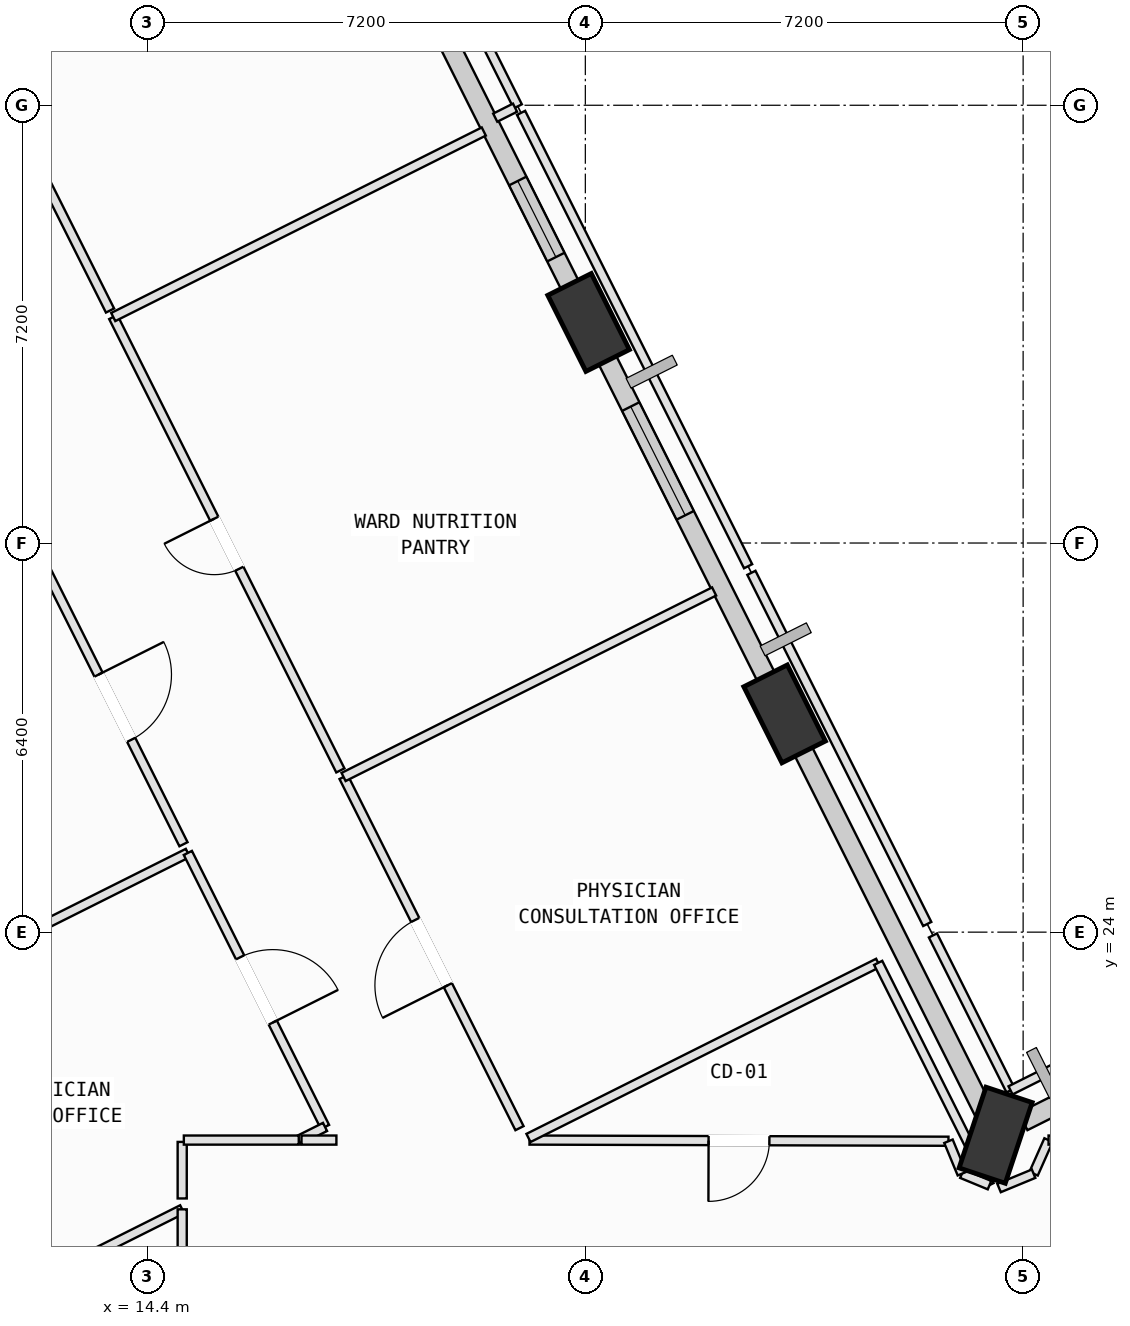
"""IFC4 building model, lengths in metres.
Left out: names, types, materials, properties, quantities, classifications, styles, units other than length and angle.
Written with IfcOpenShell. Run it as: python <this file> out.ifc"""

import sys

from ifc_helpers import new_model, si_unit, direction, frame, frame_2d, origin, origin_2d, place, context, subcontext, project, spatial, rectangle, extrude, element, fill, save


model = new_model("IFC4")
c1 = context("Model", 3, precision=1e-05, world=origin(), true_north=direction((0.0, 1.0)))
c2 = subcontext(c1, "Body", "Model", "MODEL_VIEW")
j1 = project(units=[si_unit("LENGTHUNIT", "METRE"), si_unit("PLANEANGLEUNIT", "RADIAN")], contexts=[c1])
p1 = place(None, origin())
s1 = spatial("IfcSite", under=j1, at=p1, CompositionType="ELEMENT")
p2 = place(p1, origin())
s2 = spatial("IfcBuilding", under=s1, at=p2, CompositionType="ELEMENT")
p3 = place(p2, frame((0.0, 0.0, 136.4)))
s3 = spatial("IfcBuildingStorey", under=s2, at=p3, CompositionType="ELEMENT", Elevation=136.4)
p4 = place(p3, frame((28.348, 20.66, 0.002), z_axis=(0.017282154619, -0.021617960194, 0.99961692209), x_axis=(-0.345727391393, 0.93796742084, 0.026261916961)))
e1 = element("IfcColumn", 1, at=p4, inside=s3, PredefinedType="COLUMN", context=c2, shape_type="SweptSolid", body=[
    extrude(rectangle(XDim=1.4, YDim=0.8, at=origin_2d()), origin(), (0.0, 0.0, 1.0), 3.998),
])
p5 = place(p3, frame((24.878, 27.59, 0.002), z_axis=(-0.011293721781, -0.036200956843, 0.999280712599), x_axis=(-0.161338689322, 0.986316421564, 0.033907873448)))
e2 = element("IfcColumn", 2, at=p5, inside=s3, PredefinedType="COLUMN", context=c2, shape_type="SweptSolid", body=[
    extrude(rectangle(XDim=1.4, YDim=0.8, at=origin_2d()), origin(), (0.0, 0.0, 1.0), 3.999),
])
p6 = place(p3, frame((21.654, 34.028, 0.002), z_axis=(-0.037802459463, -0.04975291439, 0.998045901534), x_axis=(0.183369674187, 0.981455024932, 0.055871250433)))
e3 = element("IfcColumn", 3, at=p6, inside=s3, PredefinedType="COLUMN", context=c2, shape_type="SweptSolid", body=[
    extrude(rectangle(XDim=1.4, YDim=0.8, at=origin_2d()), origin(), (0.0, 0.0, 1.0), 4.004),
])
p7 = place(p3, frame((18.967, 39.393, 0.002), z_axis=(-0.059772525944, -0.060929020845, 0.996350791419), x_axis=(0.304258319509, 0.949527435754, 0.076318567594)))
e4 = element("IfcColumn", 4, at=p7, inside=s3, PredefinedType="COLUMN", context=c2, shape_type="SweptSolid", body=[
    extrude(rectangle(XDim=1.4, YDim=0.8, at=origin_2d()), origin(), (0.0, 0.0, 1.0), 4.011),
])
p8 = place(p3, frame((28.799, 20.886, 0.0), z_axis=(0.0, 0.0, 1.0), x_axis=(0.894148466578, 0.447770610599, 0.0)))
e5 = element("IfcWall", 5, at=p8, inside=s3, PredefinedType="SOLIDWALL", context=c2, shape_type="SweptSolid", body=[
    extrude(rectangle(XDim=5.96, YDim=0.32, at=frame_2d((2.98, 0.0))), origin(), (0.0, 0.0, 1.0), 2.965),
])
p9 = place(p3, frame((25.123, 27.1, 0.0), z_axis=(0.0, 0.0, 1.0), x_axis=(0.447762469935, -0.894152543204, 0.0)))
e6 = element("IfcWall", 6, at=p9, inside=s3, PredefinedType="SOLIDWALL", context=c2, shape_type="SweptSolid", body=[
    extrude(rectangle(XDim=6.76, YDim=0.32, at=frame_2d((3.38, 0.0))), origin(), (0.0, 0.0, 1.0), 3.165),
])
p10 = place(p3, frame((21.895, 33.546, 0.0), z_axis=(0.0, 0.0, 1.0), x_axis=(0.447731401231, -0.894168100724, 0.0)))
e7 = element("IfcWall", 7, at=p10, inside=s3, PredefinedType="SOLIDWALL", context=c2, shape_type="SweptSolid", body=[
    extrude(rectangle(XDim=6.223, YDim=0.32, at=frame_2d((3.111, 0.0))), origin(), (0.0, 0.0, 1.0), 3.165),
])
p11 = place(p10, frame((1.009, 0.0, 0.75)))
e8 = element("IfcOpeningElement", 8, at=p11, cuts=e7, PredefinedType="OPENING", context=c2, shape_type="SweptSolid", body=[
    extrude(rectangle(XDim=2.0, YDim=1.95, at=frame_2d((1.0, 0.975))), frame((0.0, 0.17, 0.0), z_axis=(0.0, -1.0, 0.0), x_axis=(1.0, 0.0, 0.0)), (0.0, 0.0, 1.0), 0.34),
])
p12 = place(p3, frame((19.202, 38.924, 0.0), z_axis=(0.0, 0.0, 1.0), x_axis=(0.447755250405, -0.894156158473, 0.0)))
e9 = element("IfcWall", 9, at=p12, inside=s3, PredefinedType="SOLIDWALL", context=c2, shape_type="SweptSolid", body=[
    extrude(rectangle(XDim=5.047, YDim=0.32, at=frame_2d((2.524, 0.0))), origin(), (0.0, 0.0, 1.0), 3.165),
])
p13 = place(p12, frame((2.873, 0.0, 0.75)))
e10 = element("IfcOpeningElement", 10, at=p13, cuts=e9, PredefinedType="OPENING", context=c2, shape_type="SweptSolid", body=[
    extrude(rectangle(XDim=1.4, YDim=1.85, at=frame_2d((0.7, 0.925))), frame((0.0, 0.17, 0.0), z_axis=(0.0, -1.0, 0.0), x_axis=(1.0, 0.0, 0.0)), (0.0, 0.0, 1.0), 0.34),
])
p14 = place(p3, frame((7.587, 15.744, 0.0), z_axis=(0.0, 0.0, 1.0), x_axis=(0.894160922131, 0.447745737371, 0.0)))
e11 = element("IfcWall", 11, at=p14, inside=s3, PredefinedType="PARTITIONING", context=c2, shape_type="SweptSolid", body=[
    extrude(rectangle(XDim=8.257, YDim=0.15, at=frame_2d((4.128, 0.0))), origin(), (0.0, 0.0, 1.0), 3.78),
])
p15 = place(p14, frame((3.529, 0.0, 0.0)))
e12 = element("IfcOpeningElement", 12, at=p15, cuts=e11, PredefinedType="OPENING", context=c2, shape_type="SweptSolid", body=[
    extrude(rectangle(XDim=1.2, YDim=2.15, at=frame_2d((0.6, 1.075))), frame((0.0, 0.085, 0.0), z_axis=(0.0, -1.0, 0.0), x_axis=(1.0, 0.0, 0.0)), (0.0, 0.0, 1.0), 0.17),
])
p16 = place(p3, frame((14.97, 19.441, 0.0), z_axis=(0.0, 0.0, 1.0), x_axis=(0.0, -1.0, 0.0)))
e13 = element("IfcWall", 13, at=p16, inside=s3, PredefinedType="PARTITIONING", context=c2, shape_type="SweptSolid", body=[
    extrude(rectangle(XDim=1.211, YDim=0.15, at=frame_2d((0.605, 0.0))), origin(), (0.0, 0.0, 1.0), 2.965),
])
p17 = place(p3, frame((14.97, 20.55, 0.0), z_axis=(0.0, 0.0, 1.0), x_axis=(0.0, -1.0, 0.0)))
e14 = element("IfcWall", 14, at=p17, inside=s3, PredefinedType="PARTITIONING", context=c2, shape_type="SweptSolid", body=[
    extrude(rectangle(XDim=0.93, YDim=0.15, at=frame_2d((0.465, 0.0))), origin(), (0.0, 0.0, 1.0), 2.965),
])
p18 = place(p3, frame((5.203, 20.366, 0.0), z_axis=(0.0, 0.0, 1.0), x_axis=(0.894174650725, 0.447718319929, 0.0)))
e15 = element("IfcWall", 15, at=p18, inside=s3, PredefinedType="PARTITIONING", context=c2, shape_type="SweptSolid", body=[
    extrude(rectangle(XDim=11.027, YDim=0.15, at=frame_2d((5.514, 0.0))), origin(), (0.0, 0.0, 1.0), 3.78),
])
p19 = place(p3, frame((15.063, 25.303, 0.0), z_axis=(0.0, 0.0, 1.0), x_axis=(0.447620432857, -0.894223656637, 0.0)))
e16 = element("IfcWall", 16, at=p19, inside=s3, PredefinedType="PARTITIONING", context=c2, shape_type="SweptSolid", body=[
    extrude(rectangle(XDim=5.04, YDim=0.15, at=frame_2d((2.52, 0.0))), origin(), (0.0, 0.0, 1.0), 3.78),
])
p20 = place(p19, frame((1.92, 0.0, 0.0)))
e17 = element("IfcOpeningElement", 17, at=p20, cuts=e16, PredefinedType="OPENING", context=c2, shape_type="SweptSolid", body=[
    extrude(rectangle(XDim=1.2, YDim=2.15, at=frame_2d((0.6, 1.075))), frame((0.0, 0.085, 0.0), z_axis=(0.0, -1.0, 0.0), x_axis=(1.0, 0.0, 0.0)), (0.0, 0.0, 1.0), 0.17),
])
p21 = place(p3, frame((17.319, 20.796, 0.0), z_axis=(0.0, 0.0, 1.0), x_axis=(-0.894629275708, -0.446809197585, 0.0)))
e18 = element("IfcWall", 18, at=p21, inside=s3, PredefinedType="PARTITIONING", context=c2, shape_type="SweptSolid", body=[
    extrude(rectangle(XDim=0.483, YDim=0.15, at=frame_2d((0.241, 0.0))), origin(), (0.0, 0.0, 1.0), 3.78),
])
p22 = place(p3, frame((16.887, 20.58, 0.0), z_axis=(0.0, 0.0, 1.0), x_axis=(-1.0, 0.0, 0.0)))
e19 = element("IfcWall", 19, at=p22, inside=s3, PredefinedType="PARTITIONING", context=c2, shape_type="SweptSolid", body=[
    extrude(rectangle(XDim=1.89, YDim=0.15, at=frame_2d((0.945, 0.0))), origin(), (0.0, 0.0, 1.0), 3.78),
])
p23 = place(p3, frame((12.734, 29.953, 0.0), z_axis=(0.0, 0.0, 1.0), x_axis=(0.447794738158, -0.894136383601, 0.0)))
e20 = element("IfcWall", 20, at=p23, inside=s3, PredefinedType="PARTITIONING", context=c2, shape_type="SweptSolid", body=[
    extrude(rectangle(XDim=5.041, YDim=0.15, at=frame_2d((2.52, 0.0))), origin(), (0.0, 0.0, 1.0), 3.78),
])
p24 = place(p23, frame((1.92, 0.0, 0.0)))
e21 = element("IfcOpeningElement", 21, at=p24, cuts=e20, PredefinedType="OPENING", context=c2, shape_type="SweptSolid", body=[
    extrude(rectangle(XDim=1.2, YDim=2.15, at=frame_2d((0.6, 1.075))), frame((0.0, 0.085, 0.0), z_axis=(0.0, -1.0, 0.0), x_axis=(1.0, 0.0, 0.0)), (0.0, 0.0, 1.0), 0.17),
])
p25 = place(p3, frame((27.572, 20.561, 0.0), z_axis=(0.0, 0.0, 1.0), x_axis=(-0.999996180723, 0.002763790734, 0.0)))
e22 = element("IfcWall", 22, at=p25, inside=s3, PredefinedType="PARTITIONING", context=c2, shape_type="SweptSolid", body=[
    extrude(rectangle(XDim=6.89, YDim=0.15, at=frame_2d((3.445, 0.0))), origin(), (0.0, 0.0, 1.0), 3.78),
])
p26 = place(p25, frame((2.945, 0.0, 0.0)))
e23 = element("IfcOpeningElement", 23, at=p26, cuts=e22, PredefinedType="OPENING", context=c2, shape_type="SweptSolid", body=[
    extrude(rectangle(XDim=1.0, YDim=2.12, at=frame_2d((0.5, 1.06))), frame((0.0, 0.085, 0.0), z_axis=(0.0, -1.0, 0.0), x_axis=(1.0, 0.0, 0.0)), (0.0, 0.0, 1.0), 0.17),
])
p27 = place(p3, frame((20.665, 20.615, 0.0), z_axis=(0.0, 0.0, 1.0), x_axis=(0.894138524152, 0.447790463976, 0.0)))
e24 = element("IfcWall", 24, at=p27, inside=s3, PredefinedType="PARTITIONING", context=c2, shape_type="SweptSolid", body=[
    extrude(rectangle(XDim=6.432, YDim=0.15, at=frame_2d((3.216, 0.0))), origin(), (0.0, 0.0, 1.0), 3.78),
])
p28 = place(p3, frame((26.416, 23.495, 0.0), z_axis=(0.0, 0.0, 1.0), x_axis=(0.447810576622, -0.894128451323, 0.0)))
e25 = element("IfcWall", 25, at=p28, inside=s3, PredefinedType="PARTITIONING", context=c2, shape_type="SweptSolid", body=[
    extrude(rectangle(XDim=4.089, YDim=0.15, at=frame_2d((2.044, 0.0))), origin(), (0.0, 0.0, 1.0), 3.165),
])
p29 = place(p3, frame((28.247, 19.839, 0.0), z_axis=(0.0, 0.0, 1.0), x_axis=(-0.923956302996, 0.382498039412, 0.0)))
e26 = element("IfcWall", 26, at=p29, inside=s3, PredefinedType="PARTITIONING", context=c2, shape_type="SweptSolid", body=[
    extrude(rectangle(XDim=0.491, YDim=0.15, at=frame_2d((0.246, 0.0))), origin(), (0.0, 0.0, 1.0), 3.78),
])
p30 = place(p3, frame((27.793, 20.027, 0.0), z_axis=(0.0, 0.0, 1.0), x_axis=(-0.382364231834, 0.924011685107, 0.0)))
e27 = element("IfcWall", 27, at=p30, inside=s3, PredefinedType="PARTITIONING", context=c2, shape_type="SweptSolid", body=[
    extrude(rectangle(XDim=0.578, YDim=0.15, at=frame_2d((0.289, 0.0))), origin(), (0.0, 0.0, 1.0), 3.78),
])
p31 = place(p3, frame((29.218, 20.58, 0.0), z_axis=(0.0, 0.0, 1.0), x_axis=(-0.406587519567, -0.913611837123, 0.0)))
e28 = element("IfcWall", 28, at=p31, inside=s3, PredefinedType="PARTITIONING", context=c2, shape_type="SweptSolid", body=[
    extrude(rectangle(XDim=0.605, YDim=0.15, at=frame_2d((0.303, 0.0))), origin(), (0.0, 0.0, 1.0), 3.78),
])
p32 = place(p3, frame((28.972, 20.027, 0.0), z_axis=(0.0, 0.0, 1.0), x_axis=(-0.923944226518, -0.382527209861, 0.0)))
e29 = element("IfcWall", 29, at=p32, inside=s3, PredefinedType="PARTITIONING", context=c2, shape_type="SweptSolid", body=[
    extrude(rectangle(XDim=0.615, YDim=0.15, at=frame_2d((0.307, 0.0))), origin(), (0.0, 0.0, 1.0), 3.78),
])
p33 = place(p3, frame((27.317, 23.946, 0.0), z_axis=(0.0, 0.0, 1.0), x_axis=(0.447796055297, -0.894135723959, 0.0)))
e30 = element("IfcWall", 30, at=p33, inside=s3, PredefinedType="PARTITIONING", context=c2, shape_type="SweptSolid", body=[
    extrude(rectangle(XDim=2.85, YDim=0.15, at=frame_2d((1.425, 0.0))), origin(), (0.0, 0.0, 1.0), 3.78),
])
p34 = place(p3, frame((28.593, 21.398, 0.0), z_axis=(0.0, 0.0, 1.0), x_axis=(0.894187389423, 0.447692877536, 0.0)))
e31 = element("IfcWall", 31, at=p34, inside=s3, PredefinedType="PARTITIONING", context=c2, shape_type="SweptSolid", body=[
    extrude(rectangle(XDim=5.908, YDim=0.15, at=frame_2d((2.954, 0.0))), origin(), (0.0, 0.0, 1.0), 3.78),
])
p35 = place(p3, frame((34.419, 20.58, 0.0), z_axis=(0.0, 0.0, 1.0), x_axis=(-1.0, 0.0, 0.0)))
e32 = element("IfcWall", 32, at=p35, inside=s3, PredefinedType="PARTITIONING", context=c2, shape_type="SweptSolid", body=[
    extrude(rectangle(XDim=5.201, YDim=0.15, at=frame_2d((2.601, 0.0))), origin(), (0.0, 0.0, 1.0), 3.365),
])
p36 = place(p35, frame((2.101, 0.0, 0.0)))
e33 = element("IfcOpeningElement", 33, at=p36, cuts=e32, PredefinedType="OPENING", context=c2, shape_type="SweptSolid", body=[
    extrude(rectangle(XDim=1.0, YDim=2.12, at=frame_2d((0.5, 1.06))), frame((0.0, 0.085, 0.0), z_axis=(0.0, -1.0, 0.0), x_axis=(1.0, 0.0, 0.0)), (0.0, 0.0, 1.0), 0.17),
])
p37 = place(p3, frame((20.517, 20.776, 0.0), z_axis=(0.0, 0.0, 1.0), x_axis=(-0.447833274266, 0.894117083195, 0.0)))
e34 = element("IfcWall", 34, at=p37, inside=s3, PredefinedType="PARTITIONING", context=c2, shape_type="SweptSolid", body=[
    extrude(rectangle(XDim=6.46, YDim=0.15, at=frame_2d((3.23, 0.0))), origin(), (0.0, 0.0, 1.0), 3.78),
])
p38 = place(p37, frame((2.63, 0.0, 0.0)))
e35 = element("IfcOpeningElement", 35, at=p38, cuts=e34, PredefinedType="OPENING", context=c2, shape_type="SweptSolid", body=[
    extrude(rectangle(XDim=1.2, YDim=2.15, at=frame_2d((0.6, 1.075))), frame((0.0, 0.085, 0.0), z_axis=(0.0, -1.0, 0.0), x_axis=(1.0, 0.0, 0.0)), (0.0, 0.0, 1.0), 0.17),
])
p39 = place(p3, frame((17.624, 26.552, 0.0), z_axis=(0.0, 0.0, 1.0), x_axis=(0.894190630835, 0.447686403331, 0.0)))
e36 = element("IfcWall", 36, at=p39, inside=s3, PredefinedType="PARTITIONING", context=c2, shape_type="SweptSolid", body=[
    extrude(rectangle(XDim=6.815, YDim=0.15, at=frame_2d((3.408, 0.0))), origin(), (0.0, 0.0, 1.0), 3.78),
])
p40 = place(p3, frame((24.331, 29.91, 0.0), z_axis=(0.0, 0.0, 1.0), x_axis=(0.447697322881, -0.894185163758, 0.0)))
e37 = element("IfcWall", 37, at=p40, inside=s3, PredefinedType="PARTITIONING", context=c2, shape_type="SweptSolid", body=[
    extrude(rectangle(XDim=6.459, YDim=0.15, at=frame_2d((3.23, 0.0))), origin(), (0.0, 0.0, 1.0), 3.78),
])
p41 = place(p3, frame((17.571, 26.66, 0.0), z_axis=(0.0, 0.0, 1.0), x_axis=(-0.447845777943, 0.894110820412, 0.0)))
e38 = element("IfcWall", 38, at=p41, inside=s3, PredefinedType="PARTITIONING", context=c2, shape_type="SweptSolid", body=[
    extrude(rectangle(XDim=8.34, YDim=0.15, at=frame_2d((4.17, 0.0))), origin(), (0.0, 0.0, 1.0), 3.78),
])
p42 = place(p41, frame((3.71, 0.0, 0.0)))
e39 = element("IfcOpeningElement", 39, at=p42, cuts=e38, PredefinedType="OPENING", context=c2, shape_type="SweptSolid", body=[
    extrude(rectangle(XDim=0.92, YDim=2.1, at=frame_2d((0.46, 1.05))), frame((0.0, 0.085, 0.0), z_axis=(0.0, -1.0, 0.0), x_axis=(1.0, 0.0, 0.0)), (0.0, 0.0, 1.0), 0.17),
])
p43 = place(p3, frame((13.836, 34.117, 0.0), z_axis=(0.0, 0.0, 1.0), x_axis=(0.894190630835, 0.447686403331, 0.0)))
e40 = element("IfcWall", 40, at=p43, inside=s3, PredefinedType="PARTITIONING", context=c2, shape_type="SweptSolid", body=[
    extrude(rectangle(XDim=6.815, YDim=0.15, at=frame_2d((3.408, 0.0))), origin(), (0.0, 0.0, 1.0), 3.78),
])
p44 = place(p3, frame((20.543, 37.475, 0.0), z_axis=(0.0, 0.0, 1.0), x_axis=(0.447752163622, -0.894157704195, 0.0)))
e41 = element("IfcWall", 41, at=p44, inside=s3, PredefinedType="PARTITIONING", context=c2, shape_type="SweptSolid", body=[
    extrude(rectangle(XDim=8.34, YDim=0.15, at=frame_2d((4.17, 0.0))), origin(), (0.0, 0.0, 1.0), 3.78),
])
p45 = place(p3, frame((17.265, 44.02, 0.0), z_axis=(0.0, 0.0, 1.0), x_axis=(0.447783151699, -0.894142186151, 0.0)))
e42 = element("IfcWall", 42, at=p45, inside=s3, PredefinedType="PARTITIONING", context=c2, shape_type="SweptSolid", body=[
    extrude(rectangle(XDim=7.2, YDim=0.15, at=frame_2d((3.6, 0.0))), origin(), (0.0, 0.0, 1.0), 3.78),
])
p46 = place(p3, frame((20.444, 37.56, 0.0), z_axis=(0.0, 0.0, 1.0), x_axis=(-0.893354745545, -0.44935208758, 0.0)))
e43 = element("IfcWall", 43, at=p46, inside=s3, PredefinedType="PARTITIONING", context=c2, shape_type="SweptSolid", body=[
    extrude(rectangle(XDim=0.365, YDim=0.15, at=frame_2d((0.183, 0.0))), origin(), (0.0, 0.0, 1.0), 3.78),
])
p47 = place(p3, frame((13.783, 34.224, 0.0), z_axis=(0.0, 0.0, 1.0), x_axis=(-0.447846999207, 0.8941102087, 0.0)))
e44 = element("IfcWall", 44, at=p47, inside=s3, PredefinedType="PARTITIONING", context=c2, shape_type="SweptSolid", body=[
    extrude(rectangle(XDim=8.016, YDim=0.15, at=frame_2d((4.008, 0.0))), origin(), (0.0, 0.0, 1.0), 3.78),
])
p48 = place(p47, frame((3.548, 0.0, 0.0)))
e45 = element("IfcOpeningElement", 45, at=p48, cuts=e44, PredefinedType="OPENING", context=c2, shape_type="SweptSolid", body=[
    extrude(rectangle(XDim=0.92, YDim=2.1, at=frame_2d((0.46, 1.05))), frame((0.0, 0.085, 0.0), z_axis=(0.0, -1.0, 0.0), x_axis=(1.0, 0.0, 0.0)), (0.0, 0.0, 1.0), 0.17),
])
p49 = place(p3, frame((17.506, 20.58, 0.0), z_axis=(0.0, 0.0, 1.0), x_axis=(-1.0, 0.0, 0.0)))
e46 = element("IfcWall", 46, at=p49, inside=s3, PredefinedType="PARTITIONING", context=c2, shape_type="SweptSolid", body=[
    extrude(rectangle(XDim=0.574, YDim=0.15, at=frame_2d((0.287, 0.0))), origin(), (0.0, 0.0, 1.0), 3.78),
])
p50 = place(p11, origin())
e47 = element("IfcWindow", 47, at=p50, inside=s3, PartitioningType="SINGLE_PANEL", PredefinedType="WINDOW", context=c2, shape_type="SweptSolid", body=[
    extrude(rectangle(XDim=2.0, YDim=1.95, at=frame_2d((1.0, 0.975))), frame((0.0, 0.03, 0.0), z_axis=(0.0, -1.0, 0.0), x_axis=(1.0, 0.0, 0.0)), (0.0, 0.0, 1.0), 0.06),
])
fill(e8, e47)
p51 = place(p13, origin())
e48 = element("IfcWindow", 48, at=p51, inside=s3, PartitioningType="SINGLE_PANEL", PredefinedType="WINDOW", context=c2, shape_type="SweptSolid", body=[
    extrude(rectangle(XDim=1.4, YDim=1.85, at=frame_2d((0.7, 0.925))), frame((0.0, 0.03, 0.0), z_axis=(0.0, -1.0, 0.0), x_axis=(1.0, 0.0, 0.0)), (0.0, 0.0, 1.0), 0.06),
])
fill(e10, e48)
p52 = place(p20, origin())
e49 = element("IfcDoor", 49, at=p52, inside=s3, OperationType="SINGLE_SWING_RIGHT", PredefinedType="DOOR", context=c2, shape_type="SweptSolid", body=[
    extrude(rectangle(XDim=1.2, YDim=2.15, at=frame_2d((0.6, 1.075))), frame((0.0, 0.025, 0.0), z_axis=(0.0, -1.0, 0.0), x_axis=(1.0, 0.0, 0.0)), (0.0, 0.0, 1.0), 0.05),
])
fill(e17, e49)
p53 = place(p24, origin())
e50 = element("IfcDoor", 50, at=p53, inside=s3, OperationType="SINGLE_SWING_LEFT", PredefinedType="DOOR", context=c2, shape_type="SweptSolid", body=[
    extrude(rectangle(XDim=1.2, YDim=2.15, at=frame_2d((0.6, 1.075))), frame((0.0, 0.025, 0.0), z_axis=(0.0, -1.0, 0.0), x_axis=(1.0, 0.0, 0.0)), (0.0, 0.0, 1.0), 0.05),
])
fill(e21, e50)
p54 = place(p26, origin())
e51 = element("IfcDoor", 51, at=p54, inside=s3, OperationType="SINGLE_SWING_RIGHT", PredefinedType="DOOR", context=c2, shape_type="SweptSolid", body=[
    extrude(rectangle(XDim=1.0, YDim=2.12, at=frame_2d((0.5, 1.06))), frame((0.0, 0.025, 0.0), z_axis=(0.0, -1.0, 0.0), x_axis=(1.0, 0.0, 0.0)), (0.0, 0.0, 1.0), 0.05),
])
fill(e23, e51)
p55 = place(p38, origin())
e52 = element("IfcDoor", 52, at=p55, inside=s3, OperationType="SINGLE_SWING_LEFT", PredefinedType="DOOR", context=c2, shape_type="SweptSolid", body=[
    extrude(rectangle(XDim=1.2, YDim=2.15, at=frame_2d((0.6, 1.075))), frame((0.0, 0.025, 0.0), z_axis=(0.0, -1.0, 0.0), x_axis=(1.0, 0.0, 0.0)), (0.0, 0.0, 1.0), 0.05),
])
fill(e35, e52)
p56 = place(p42, origin())
e53 = element("IfcDoor", 53, at=p56, inside=s3, OperationType="SINGLE_SWING_RIGHT", PredefinedType="DOOR", context=c2, shape_type="SweptSolid", body=[
    extrude(rectangle(XDim=0.92, YDim=2.1, at=frame_2d((0.46, 1.05))), frame((0.0, 0.025, 0.0), z_axis=(0.0, -1.0, 0.0), x_axis=(1.0, 0.0, 0.0)), (0.0, 0.0, 1.0), 0.05),
])
fill(e39, e53)
save(model, sys.argv[1])
